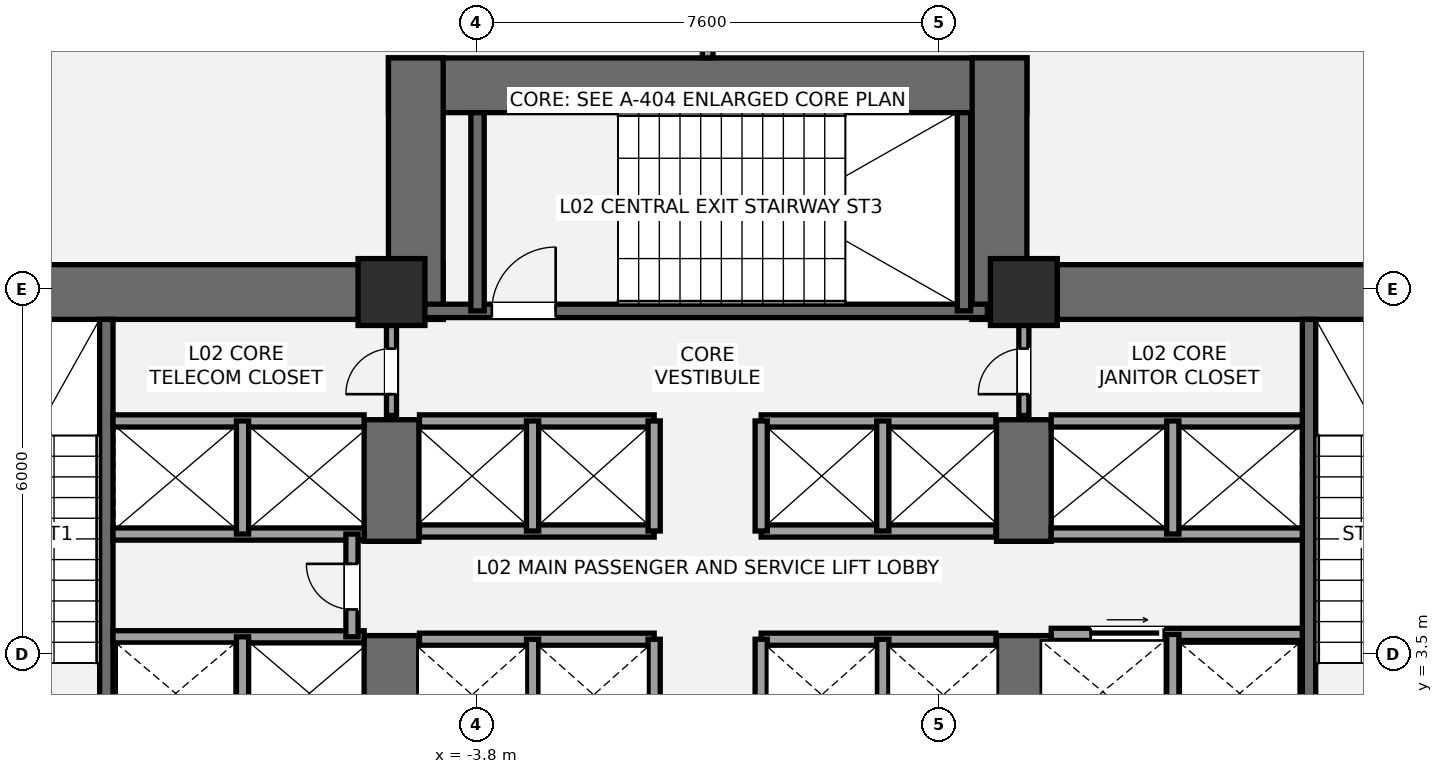
"""IFC4 building model, lengths in metres.
Left out: names, types, materials, properties, quantities, classifications, styles, units other than length and angle.
Written with IfcOpenShell. Run it as: python <this file> out.ifc"""

import sys

from ifc_helpers import new_model, si_unit, direction, frame, frame_2d, origin, origin_2d, place, context, subcontext, project, spatial, rectangle, extrude, element, fill, save


model = new_model("IFC4")
c1 = context("Model", 3, precision=1e-05, world=origin(), true_north=direction((0.0, 1.0)))
c2 = subcontext(c1, "Body", "Model", "MODEL_VIEW")
j1 = project(units=[si_unit("LENGTHUNIT", "METRE"), si_unit("PLANEANGLEUNIT", "RADIAN")], contexts=[c1])
p1 = place(None, origin())
s1 = spatial("IfcSite", under=j1, at=p1, CompositionType="ELEMENT")
p2 = place(p1, origin())
s2 = spatial("IfcBuilding", under=s1, at=p2, CompositionType="ELEMENT")
p3 = place(p2, frame((0.0, 0.0, 10.2)))
s3 = spatial("IfcBuildingStorey", under=s2, at=p3, CompositionType="ELEMENT", Elevation=10.2)
p4 = place(p3, frame((-14.05, 9.45, 0.0), z_axis=(0.0, 0.0, 1.0), x_axis=(1.0, 0.0, 0.0)))
e1 = element("IfcWall", 1, at=p4, inside=s3, PredefinedType="SHEAR", context=c2, shape_type="SweptSolid", body=[
    extrude(rectangle(XDim=9.7, YDim=0.9, at=frame_2d((4.85, 0.0))), origin(), (0.0, 0.0, 1.0), 4.2),
])
p5 = place(p3, frame((-5.2, 0.95, 0.0), z_axis=(0.0, 0.0, 1.0), x_axis=(0.0, 1.0, 0.0)))
e2 = element("IfcWall", 2, at=p5, inside=s3, PredefinedType="SHEAR", context=c2, shape_type="SweptSolid", body=[
    extrude(rectangle(XDim=2.85, YDim=0.9, at=frame_2d((1.425, 0.0))), origin(), (0.0, 0.0, 1.0), 4.2),
])
p6 = place(p3, frame((-5.2, 5.35, 0.0), z_axis=(0.0, 0.0, 1.0), x_axis=(0.0, 1.0, 0.0)))
e3 = element("IfcWall", 3, at=p6, inside=s3, PredefinedType="SHEAR", context=c2, shape_type="SweptSolid", body=[
    extrude(rectangle(XDim=2.0, YDim=0.9, at=frame_2d((1.0, 0.0))), origin(), (0.0, 0.0, 1.0), 4.2),
])
p7 = place(p3, frame((-9.89, 1.85, 0.0), z_axis=(0.0, 0.0, 1.0), x_axis=(0.0, 1.0, 0.0)))
e4 = element("IfcWall", 4, at=p7, inside=s3, PredefinedType="SHEAR", context=c2, shape_type="SweptSolid", body=[
    extrude(rectangle(XDim=7.15, YDim=0.22, at=frame_2d((3.575, 0.0))), origin(), (0.0, 0.0, 1.0), 4.2),
])
p8 = place(p3, frame((4.35, 9.45, 0.0), z_axis=(0.0, 0.0, 1.0), x_axis=(1.0, 0.0, 0.0)))
e5 = element("IfcWall", 5, at=p8, inside=s3, PredefinedType="SHEAR", context=c2, shape_type="SweptSolid", body=[
    extrude(rectangle(XDim=9.7, YDim=0.9, at=frame_2d((4.85, 0.0))), origin(), (0.0, 0.0, 1.0), 4.2),
])
p9 = place(p3, frame((5.2, 0.95, 0.0), z_axis=(0.0, 0.0, 1.0), x_axis=(0.0, 1.0, 0.0)))
e6 = element("IfcWall", 6, at=p9, inside=s3, PredefinedType="SHEAR", context=c2, shape_type="SweptSolid", body=[
    extrude(rectangle(XDim=2.85, YDim=0.9, at=frame_2d((1.425, 0.0))), origin(), (0.0, 0.0, 1.0), 4.2),
])
p10 = place(p3, frame((5.2, 5.35, 0.0), z_axis=(0.0, 0.0, 1.0), x_axis=(0.0, 1.0, 0.0)))
e7 = element("IfcWall", 7, at=p10, inside=s3, PredefinedType="SHEAR", context=c2, shape_type="SweptSolid", body=[
    extrude(rectangle(XDim=2.0, YDim=0.9, at=frame_2d((1.0, 0.0))), origin(), (0.0, 0.0, 1.0), 4.2),
])
p11 = place(p3, frame((9.89, 1.85, 0.0), z_axis=(0.0, 0.0, 1.0), x_axis=(0.0, 1.0, 0.0)))
e8 = element("IfcWall", 8, at=p11, inside=s3, PredefinedType="SHEAR", context=c2, shape_type="SweptSolid", body=[
    extrude(rectangle(XDim=7.15, YDim=0.22, at=frame_2d((3.575, 0.0))), origin(), (0.0, 0.0, 1.0), 4.2),
])
p12 = place(p3, frame((-5.25, 12.85, 0.0), z_axis=(0.0, 0.0, 1.0), x_axis=(1.0, 0.0, 0.0)))
e9 = element("IfcWall", 9, at=p12, inside=s3, PredefinedType="SHEAR", context=c2, shape_type="SweptSolid", body=[
    extrude(rectangle(XDim=10.5, YDim=0.9, at=frame_2d((5.25, 0.0))), origin(), (0.0, 0.0, 1.0), 4.2),
])
for number, where, z_axis, x_axis in (
    (10, (-4.8, 9.0, 0.0), (0.0, 0.0, 1.0), (0.0, 1.0, 0.0)),
    (11, (4.8, 9.0, 0.0), (0.0, 0.0, 1.0), (0.0, 1.0, 0.0)),
):
    element("IfcWall", number, at=place(p3, frame(where, z_axis=z_axis, x_axis=x_axis)), inside=s3, PredefinedType="SHEAR", context=c2, shape_type="SweptSolid", body=[
        extrude(rectangle(XDim=4.3, YDim=0.9, at=frame_2d((2.15, 0.0))), origin(), (0.0, 0.0, 1.0), 4.2),
    ])
p13 = place(p3, frame((-4.7, 9.14, 0.0), z_axis=(0.0, 0.0, 1.0), x_axis=(1.0, 0.0, 0.0)))
e12 = element("IfcWall", 12, at=p13, inside=s3, PredefinedType="SHEAR", context=c2, shape_type="SweptSolid", body=[
    extrude(rectangle(XDim=9.3, YDim=0.22, at=frame_2d((4.65, 0.0))), origin(), (0.0, 0.0, 1.0), 4.2),
])
p14 = place(p13, frame((1.15, 0.0, 0.0)))
e13 = element("IfcOpeningElement", 13, at=p14, cuts=e12, PredefinedType="OPENING", context=c2, shape_type="SweptSolid", body=[
    extrude(rectangle(XDim=1.05, YDim=2.15, at=frame_2d((0.525, 1.075))), frame((0.0, 0.12, 0.0), z_axis=(0.0, -1.0, 0.0), x_axis=(1.0, 0.0, 0.0)), (0.0, 0.0, 1.0), 0.24),
])
for number, where, z_axis, x_axis in (
    (14, (-3.785, 9.14, 0.0), (0.0, 0.0, 1.0), (0.0, 1.0, 0.0)),
    (15, (4.215, 9.14, 0.0), (0.0, 0.0, 1.0), (0.0, 1.0, 0.0)),
):
    element("IfcWall", number, at=place(p3, frame(where, z_axis=z_axis, x_axis=x_axis)), inside=s3, PredefinedType="SHEAR", context=c2, shape_type="SweptSolid", body=[
        extrude(rectangle(XDim=3.26, YDim=0.22, at=frame_2d((1.63, 0.0))), origin(), (0.0, 0.0, 1.0), 4.2),
    ])
for number, where, z_axis, x_axis in (
    (16, (-5.2, 9.45, 0.0), (0.0, 0.0, 1.0), (1.0, 0.0, 0.0)),
    (17, (5.2, 9.45, 0.0), (0.0, 0.0, 1.0), (1.0, 0.0, 0.0)),
):
    element("IfcColumn", number, at=place(p3, frame(where, z_axis=z_axis, x_axis=x_axis)), inside=s3, PredefinedType="COLUMN", context=c2, shape_type="SweptSolid", body=[
        extrude(rectangle(XDim=1.1, YDim=1.1, at=origin_2d()), origin(), (0.0, 0.0, 1.0), 4.2),
    ])
p15 = place(p3, frame((-9.78, 3.78, 0.0), z_axis=(0.0, 0.0, 1.0), x_axis=(1.0, 0.0, 0.0)))
e18 = element("IfcWall", 18, at=p15, inside=s3, PredefinedType="SOLIDWALL", context=c2, shape_type="SweptSolid", body=[
    extrude(rectangle(XDim=4.13, YDim=0.2, at=frame_2d((2.065, 0.0))), origin(), (0.0, 0.0, 1.0), 3.98),
])
p16 = place(p3, frame((-7.65, 1.85, 0.0), z_axis=(0.0, 0.0, 1.0), x_axis=(0.0, 1.0, 0.0)))
e19 = element("IfcWall", 19, at=p16, inside=s3, PredefinedType="SOLIDWALL", context=c2, shape_type="SweptSolid", body=[
    extrude(rectangle(XDim=1.93, YDim=0.2, at=frame_2d((0.965, 0.0))), origin(), (0.0, 0.0, 1.0), 3.98),
])
for number, where, z_axis, x_axis in (
    (20, (-9.78, 5.47, 0.0), (0.0, 0.0, 1.0), (1.0, 0.0, 0.0)),
    (21, (-9.78, 7.33, 0.0), (0.0, 0.0, 1.0), (1.0, 0.0, 0.0)),
):
    element("IfcWall", number, at=place(p3, frame(where, z_axis=z_axis, x_axis=x_axis)), inside=s3, PredefinedType="SOLIDWALL", context=c2, shape_type="SweptSolid", body=[
        extrude(rectangle(XDim=4.13, YDim=0.2, at=frame_2d((2.065, 0.0))), origin(), (0.0, 0.0, 1.0), 3.98),
    ])
p17 = place(p3, frame((-7.65, 5.47, 0.0), z_axis=(0.0, 0.0, 1.0), x_axis=(0.0, 1.0, 0.0)))
e22 = element("IfcWall", 22, at=p17, inside=s3, PredefinedType="SOLIDWALL", context=c2, shape_type="SweptSolid", body=[
    extrude(rectangle(XDim=1.86, YDim=0.2, at=frame_2d((0.93, 0.0))), origin(), (0.0, 0.0, 1.0), 3.98),
])
p18 = place(p3, frame((-5.85, 3.78, 0.0), z_axis=(0.0, 0.0, 1.0), x_axis=(0.0, 1.0, 0.0)))
e23 = element("IfcWall", 23, at=p18, inside=s3, PredefinedType="SOLIDWALL", context=c2, shape_type="SweptSolid", body=[
    extrude(rectangle(XDim=1.69, YDim=0.2, at=frame_2d((0.845, 0.0))), origin(), (0.0, 0.0, 1.0), 3.98),
])
p19 = place(p18, frame((0.45, 0.0, 0.0)))
e24 = element("IfcOpeningElement", 24, at=p19, cuts=e23, PredefinedType="OPENING", context=c2, shape_type="SweptSolid", body=[
    extrude(rectangle(XDim=0.75, YDim=2.1, at=frame_2d((0.375, 1.05))), frame((0.0, 0.11, 0.0), z_axis=(0.0, -1.0, 0.0), x_axis=(1.0, 0.0, 0.0)), (0.0, 0.0, 1.0), 0.22),
])
p20 = place(p3, frame((5.65, 3.82, 0.0), z_axis=(0.0, 0.0, 1.0), x_axis=(1.0, 0.0, 0.0)))
e25 = element("IfcWall", 25, at=p20, inside=s3, PredefinedType="SOLIDWALL", context=c2, shape_type="SweptSolid", body=[
    extrude(rectangle(XDim=4.13, YDim=0.2, at=frame_2d((2.065, 0.0))), origin(), (0.0, 0.0, 1.0), 3.98),
])
p21 = place(p20, frame((0.65, 0.0, 0.0)))
e26 = element("IfcOpeningElement", 26, at=p21, cuts=e25, PredefinedType="OPENING", context=c2, shape_type="SweptSolid", body=[
    extrude(rectangle(XDim=1.2, YDim=2.2, at=frame_2d((0.6, 1.1))), frame((0.0, 0.11, 0.0), z_axis=(0.0, -1.0, 0.0), x_axis=(1.0, 0.0, 0.0)), (0.0, 0.0, 1.0), 0.22),
])
p22 = place(p3, frame((7.65, 1.85, 0.0), z_axis=(0.0, 0.0, 1.0), x_axis=(0.0, 1.0, 0.0)))
e27 = element("IfcWall", 27, at=p22, inside=s3, PredefinedType="SOLIDWALL", context=c2, shape_type="SweptSolid", body=[
    extrude(rectangle(XDim=1.97, YDim=0.2, at=frame_2d((0.985, 0.0))), origin(), (0.0, 0.0, 1.0), 3.98),
])
for number, where, z_axis, x_axis in (
    (28, (5.65, 5.47, 0.0), (0.0, 0.0, 1.0), (1.0, 0.0, 0.0)),
    (29, (5.65, 7.33, 0.0), (0.0, 0.0, 1.0), (1.0, 0.0, 0.0)),
):
    element("IfcWall", number, at=place(p3, frame(where, z_axis=z_axis, x_axis=x_axis)), inside=s3, PredefinedType="SOLIDWALL", context=c2, shape_type="SweptSolid", body=[
        extrude(rectangle(XDim=4.13, YDim=0.2, at=frame_2d((2.065, 0.0))), origin(), (0.0, 0.0, 1.0), 3.98),
    ])
p23 = place(p3, frame((7.65, 5.47, 0.0), z_axis=(0.0, 0.0, 1.0), x_axis=(0.0, 1.0, 0.0)))
e30 = element("IfcWall", 30, at=p23, inside=s3, PredefinedType="SOLIDWALL", context=c2, shape_type="SweptSolid", body=[
    extrude(rectangle(XDim=1.86, YDim=0.2, at=frame_2d((0.93, 0.0))), origin(), (0.0, 0.0, 1.0), 3.98),
])
for number, where, z_axis, x_axis in (
    (31, (-4.74, 3.74, 0.0), (0.0, 0.0, 1.0), (1.0, 0.0, 0.0)),
    (32, (0.88, 3.74, 0.0), (0.0, 0.0, 1.0), (1.0, 0.0, 0.0)),
):
    element("IfcWall", number, at=place(p3, frame(where, z_axis=z_axis, x_axis=x_axis)), inside=s3, PredefinedType="SOLIDWALL", context=c2, shape_type="SweptSolid", body=[
        extrude(rectangle(XDim=3.86, YDim=0.2, at=frame_2d((1.93, 0.0))), origin(), (0.0, 0.0, 1.0), 3.98),
    ])
for number, where, z_axis, x_axis in (
    (33, (-2.88, 1.92, 0.0), (0.0, 0.0, 1.0), (0.0, 1.0, 0.0)),
    (34, (2.88, 1.92, 0.0), (0.0, 0.0, 1.0), (0.0, 1.0, 0.0)),
    (35, (-0.88, 1.92, 0.0), (0.0, 0.0, 1.0), (0.0, 1.0, 0.0)),
    (36, (0.88, 1.92, 0.0), (0.0, 0.0, 1.0), (0.0, 1.0, 0.0)),
):
    element("IfcWall", number, at=place(p3, frame(where, z_axis=z_axis, x_axis=x_axis)), inside=s3, PredefinedType="SOLIDWALL", context=c2, shape_type="SweptSolid", body=[
        extrude(rectangle(XDim=1.82, YDim=0.2, at=frame_2d((0.91, 0.0))), origin(), (0.0, 0.0, 1.0), 3.98),
    ])
for number, where, z_axis, x_axis in (
    (37, (-4.74, 5.52, 0.0), (0.0, 0.0, 1.0), (1.0, 0.0, 0.0)),
    (38, (0.88, 5.52, 0.0), (0.0, 0.0, 1.0), (1.0, 0.0, 0.0)),
    (39, (-4.74, 7.33, 0.0), (0.0, 0.0, 1.0), (1.0, 0.0, 0.0)),
    (40, (0.88, 7.33, 0.0), (0.0, 0.0, 1.0), (1.0, 0.0, 0.0)),
):
    element("IfcWall", number, at=place(p3, frame(where, z_axis=z_axis, x_axis=x_axis)), inside=s3, PredefinedType="SOLIDWALL", context=c2, shape_type="SweptSolid", body=[
        extrude(rectangle(XDim=3.86, YDim=0.2, at=frame_2d((1.93, 0.0))), origin(), (0.0, 0.0, 1.0), 3.98),
    ])
for number, where, z_axis, x_axis in (
    (41, (-2.88, 5.52, 0.0), (0.0, 0.0, 1.0), (0.0, 1.0, 0.0)),
    (42, (2.88, 5.52, 0.0), (0.0, 0.0, 1.0), (0.0, 1.0, 0.0)),
    (43, (-0.88, 5.52, 0.0), (0.0, 0.0, 1.0), (0.0, 1.0, 0.0)),
    (44, (0.88, 5.52, 0.0), (0.0, 0.0, 1.0), (0.0, 1.0, 0.0)),
):
    element("IfcWall", number, at=place(p3, frame(where, z_axis=z_axis, x_axis=x_axis)), inside=s3, PredefinedType="SOLIDWALL", context=c2, shape_type="SweptSolid", body=[
        extrude(rectangle(XDim=1.81, YDim=0.2, at=frame_2d((0.905, 0.0))), origin(), (0.0, 0.0, 1.0), 3.98),
    ])
p24 = place(p3, frame((-5.2, 7.42, 0.0), z_axis=(0.0, 0.0, 1.0), x_axis=(0.0, 1.0, 0.0)))
e45 = element("IfcWall", 45, at=p24, inside=s3, PredefinedType="PARTITIONING", context=c2, shape_type="SweptSolid", body=[
    extrude(rectangle(XDim=1.58, YDim=0.165, at=frame_2d((0.79, 0.0))), origin(), (0.0, 0.0, 1.0), 3.98),
])
p25 = place(p24, frame((0.35, 0.0, 0.0)))
e46 = element("IfcOpeningElement", 46, at=p25, cuts=e45, PredefinedType="OPENING", context=c2, shape_type="SweptSolid", body=[
    extrude(rectangle(XDim=0.75, YDim=2.1, at=frame_2d((0.375, 1.05))), frame((0.0, 0.093, 0.0), z_axis=(0.0, -1.0, 0.0), x_axis=(1.0, 0.0, 0.0)), (0.0, 0.0, 1.0), 0.185),
])
p26 = place(p3, frame((5.2, 7.42, 0.0), z_axis=(0.0, 0.0, 1.0), x_axis=(0.0, 1.0, 0.0)))
e47 = element("IfcWall", 47, at=p26, inside=s3, PredefinedType="PARTITIONING", context=c2, shape_type="SweptSolid", body=[
    extrude(rectangle(XDim=1.58, YDim=0.165, at=frame_2d((0.79, 0.0))), origin(), (0.0, 0.0, 1.0), 3.98),
])
p27 = place(p26, frame((0.35, 0.0, 0.0)))
e48 = element("IfcOpeningElement", 48, at=p27, cuts=e47, PredefinedType="OPENING", context=c2, shape_type="SweptSolid", body=[
    extrude(rectangle(XDim=0.75, YDim=2.1, at=frame_2d((0.375, 1.05))), frame((0.0, 0.093, 0.0), z_axis=(0.0, -1.0, 0.0), x_axis=(1.0, 0.0, 0.0)), (0.0, 0.0, 1.0), 0.185),
])
p28 = place(p3, frame((0.0, 13.3, 0.0), z_axis=(0.0, 0.0, 1.0), x_axis=(0.0, 1.0, 0.0)))
e49 = element("IfcWall", 49, at=p28, inside=s3, PredefinedType="PARTITIONING", context=c2, shape_type="SweptSolid", body=[
    extrude(rectangle(XDim=8.106, YDim=0.175, at=frame_2d((4.053, 0.0))), origin(), (0.0, 0.0, 1.0), 3.98),
])
p29 = place(p14, origin())
e50 = element("IfcDoor", 50, at=p29, inside=s3, OperationType="SINGLE_SWING_RIGHT", PredefinedType="DOOR", context=c2, shape_type="SweptSolid", body=[
    extrude(rectangle(XDim=1.05, YDim=2.15, at=frame_2d((0.525, 1.075))), frame((0.0, 0.025, 0.0), z_axis=(0.0, -1.0, 0.0), x_axis=(1.0, 0.0, 0.0)), (0.0, 0.0, 1.0), 0.05),
])
fill(e13, e50)
p30 = place(p19, origin())
e51 = element("IfcDoor", 51, at=p30, inside=s3, OperationType="SINGLE_SWING_RIGHT", PredefinedType="DOOR", context=c2, shape_type="SweptSolid", body=[
    extrude(rectangle(XDim=0.75, YDim=2.1, at=frame_2d((0.375, 1.05))), frame((0.0, 0.025, 0.0), z_axis=(0.0, -1.0, 0.0), x_axis=(1.0, 0.0, 0.0)), (0.0, 0.0, 1.0), 0.05),
])
fill(e24, e51)
p31 = place(p21, origin())
e52 = element("IfcDoor", 52, at=p31, inside=s3, OperationType="SLIDING_TO_RIGHT", PredefinedType="DOOR", context=c2, shape_type="SweptSolid", body=[
    extrude(rectangle(XDim=1.2, YDim=2.2, at=frame_2d((0.6, 1.1))), frame((0.0, 0.025, 0.0), z_axis=(0.0, -1.0, 0.0), x_axis=(1.0, 0.0, 0.0)), (0.0, 0.0, 1.0), 0.05),
])
fill(e26, e52)
p32 = place(p25, origin())
e53 = element("IfcDoor", 53, at=p32, inside=s3, OperationType="SINGLE_SWING_LEFT", PredefinedType="DOOR", context=c2, shape_type="SweptSolid", body=[
    extrude(rectangle(XDim=0.75, YDim=2.1, at=frame_2d((0.375, 1.05))), frame((0.0, 0.025, 0.0), z_axis=(0.0, -1.0, 0.0), x_axis=(1.0, 0.0, 0.0)), (0.0, 0.0, 1.0), 0.05),
])
fill(e46, e53)
p33 = place(p27, origin())
e54 = element("IfcDoor", 54, at=p33, inside=s3, OperationType="SINGLE_SWING_LEFT", PredefinedType="DOOR", context=c2, shape_type="SweptSolid", body=[
    extrude(rectangle(XDim=0.75, YDim=2.1, at=frame_2d((0.375, 1.05))), frame((0.0, 0.025, 0.0), z_axis=(0.0, -1.0, 0.0), x_axis=(1.0, 0.0, 0.0)), (0.0, 0.0, 1.0), 0.05),
])
fill(e48, e54)
save(model, sys.argv[1])
